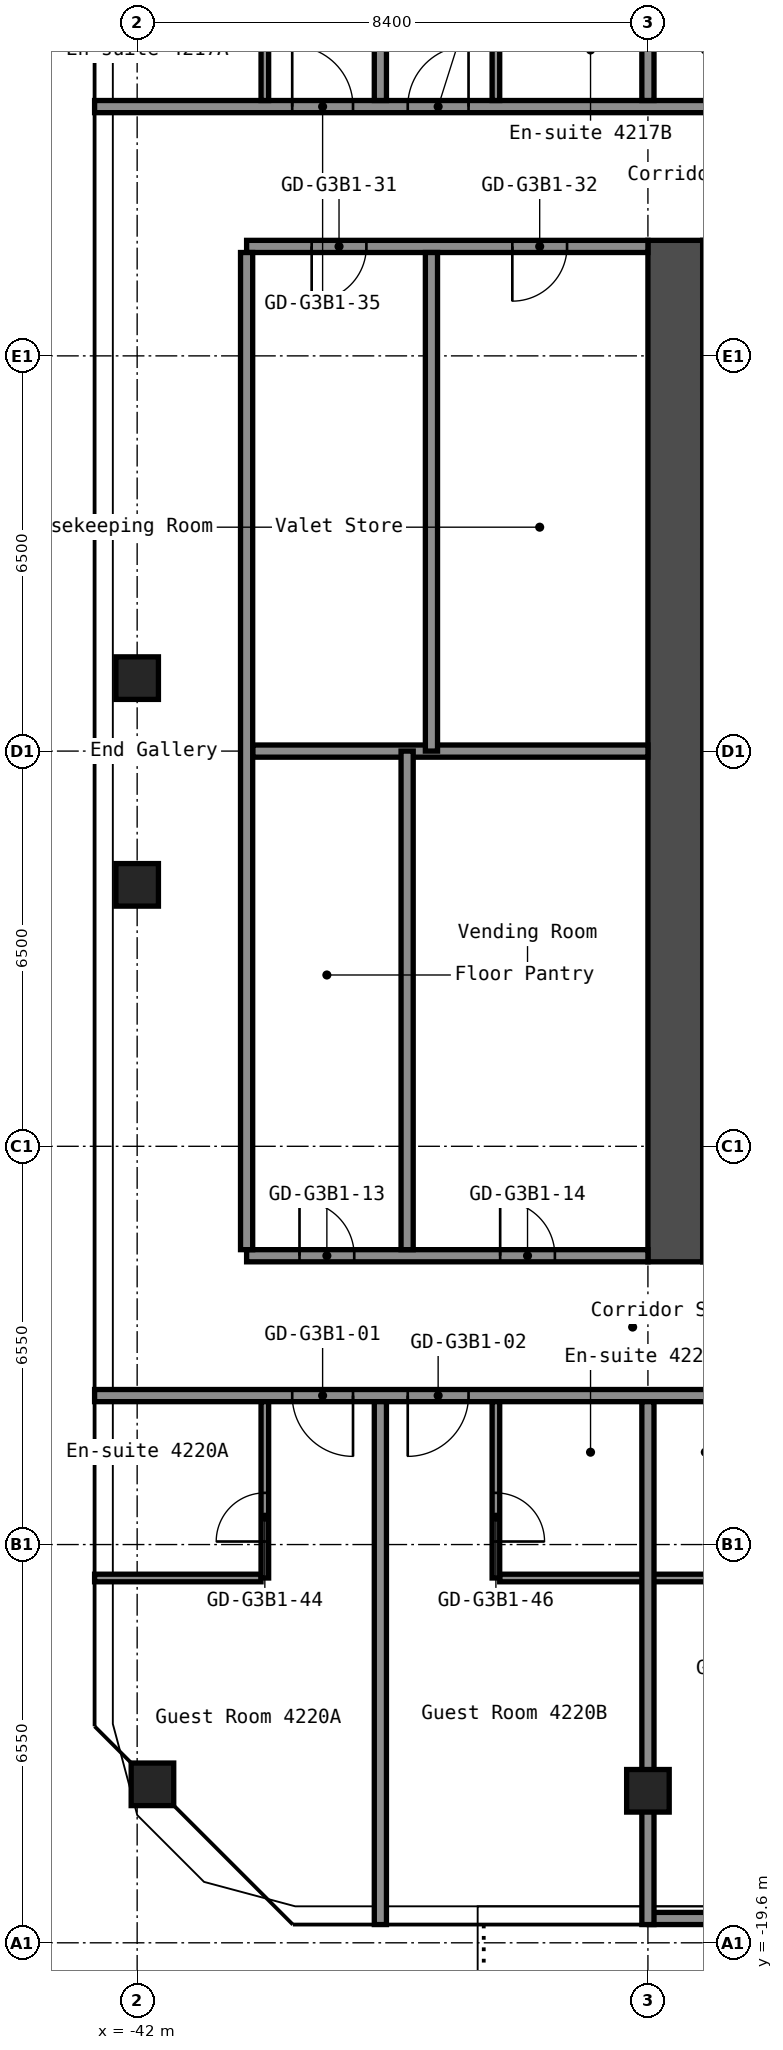
"""IFC4 building model, lengths in metres.
Left out: names, types, materials, properties, quantities, classifications, styles, units other than length and angle.
Written with IfcOpenShell. Run it as: python <this file> out.ifc"""

import sys

from ifc_helpers import new_model, si_unit, direction, frame, frame_2d, origin, origin_2d, place, context, subcontext, project, spatial, rectangle, hollow_rectangle, extrude, element, fill, save


model = new_model("IFC4")
c1 = context("Model", 3, precision=1e-05, world=origin(), true_north=direction((0.0, 1.0)))
c2 = subcontext(c1, "Body", "Model", "MODEL_VIEW")
j1 = project(units=[si_unit("LENGTHUNIT", "METRE"), si_unit("PLANEANGLEUNIT", "RADIAN")], contexts=[c1])
p1 = place(None, origin())
s1 = spatial("IfcSite", under=j1, at=p1, CompositionType="ELEMENT")
p2 = place(p1, origin())
s2 = spatial("IfcBuilding", under=s1, at=p2, CompositionType="ELEMENT")
p3 = place(p2, frame((0.0, 0.0, 150.2)))
s3 = spatial("IfcBuildingStorey", under=s2, at=p3, CompositionType="ELEMENT", Elevation=150.2)
for number, where, z_axis, x_axis in (
    (1, (-41.749, -16.994, 0.0), (0.0, 0.0, 1.0), (1.0, 0.0, 0.0)),
    (2, (-42.0, -2.2, 0.0), (0.0, 0.0, 1.0), (1.0, 0.0, 0.0)),
    (3, (-42.0, 1.2, 0.0), (0.0, 0.0, 1.0), (1.0, 0.0, 0.0)),
    (4, (-33.6, -17.1, 0.0), (0.0, 0.0, 1.0), (1.0, 0.0, 0.0)),
):
    element("IfcColumn", number, at=place(p3, frame(where, z_axis=z_axis, x_axis=x_axis)), inside=s3, PredefinedType="COLUMN", context=c2, shape_type="SweptSolid", body=[
        extrude(hollow_rectangle(XDim=0.7, YDim=0.7, WallThickness=0.028, at=origin_2d()), origin(), (0.0, 0.0, 1.0), 2.75),
    ])
p4 = place(p3, frame((-33.15, -8.4, 0.0), z_axis=(0.0, 0.0, 1.0), x_axis=(0.0, 1.0, 0.0)))
e5 = element("IfcWall", 5, at=p4, inside=s3, PredefinedType="SHEAR", context=c2, shape_type="SweptSolid", body=[
    extrude(rectangle(XDim=16.8, YDim=0.9, at=frame_2d((8.4, 0.0))), origin(), (0.0, 0.0, 1.0), 2.75),
])
p5 = place(p3, frame((-42.7, -13.6, 0.0), z_axis=(0.0, 0.0, 1.0), x_axis=(1.0, 0.0, 0.0)))
e6 = element("IfcWall", 6, at=p5, inside=s3, PredefinedType="PARTITIONING", context=c2, shape_type="SweptSolid", body=[
    extrude(rectangle(XDim=2.738, YDim=0.125, at=frame_2d((1.369, 0.0))), origin(), (0.0, 0.0, 1.0), 2.75),
])
p6 = place(p3, frame((-36.038, -13.6, 0.0), z_axis=(0.0, 0.0, 1.0), x_axis=(1.0, 0.0, 0.0)))
e7 = element("IfcWall", 7, at=p6, inside=s3, PredefinedType="PARTITIONING", context=c2, shape_type="SweptSolid", body=[
    extrude(rectangle(XDim=4.875, YDim=0.125, at=frame_2d((2.438, 0.0))), origin(), (0.0, 0.0, 1.0), 2.75),
])
p7 = place(p3, frame((-42.7, -10.6, 0.0), z_axis=(0.0, 0.0, 1.0), x_axis=(1.0, 0.0, 0.0)))
e8 = element("IfcWall", 8, at=p7, inside=s3, PredefinedType="PARTITIONING", context=c2, shape_type="SweptSolid", body=[
    extrude(rectangle(XDim=25.9, YDim=0.2, at=frame_2d((12.95, 0.0))), origin(), (0.0, 0.0, 1.0), 2.75),
])
p8 = place(p7, frame((3.25, 0.0, 0.0)))
e9 = element("IfcOpeningElement", 9, at=p8, cuts=e8, PredefinedType="OPENING", context=c2, shape_type="SweptSolid", body=[
    extrude(rectangle(XDim=1.0, YDim=2.1, at=frame_2d((0.5, 1.05))), frame((0.0, 0.11, 0.0), z_axis=(0.0, -1.0, 0.0), x_axis=(1.0, 0.0, 0.0)), (0.0, 0.0, 1.0), 0.22),
])
p9 = place(p7, frame((5.15, 0.0, 0.0)))
e10 = element("IfcOpeningElement", 10, at=p9, cuts=e8, PredefinedType="OPENING", context=c2, shape_type="SweptSolid", body=[
    extrude(rectangle(XDim=1.0, YDim=2.1, at=frame_2d((0.5, 1.05))), frame((0.0, 0.11, 0.0), z_axis=(0.0, -1.0, 0.0), x_axis=(1.0, 0.0, 0.0)), (0.0, 0.0, 1.0), 0.22),
])
p10 = place(p7, frame((11.95, 0.0, 0.0)))
e11 = element("IfcOpeningElement", 11, at=p10, cuts=e8, PredefinedType="OPENING", context=c2, shape_type="SweptSolid", body=[
    extrude(rectangle(XDim=1.0, YDim=2.1, at=frame_2d((0.5, 1.05))), frame((0.0, 0.11, 0.0), z_axis=(0.0, -1.0, 0.0), x_axis=(1.0, 0.0, 0.0)), (0.0, 0.0, 1.0), 0.22),
])
p11 = place(p7, frame((13.65, 0.0, 0.0)))
e12 = element("IfcOpeningElement", 12, at=p11, cuts=e8, PredefinedType="OPENING", context=c2, shape_type="SweptSolid", body=[
    extrude(rectangle(XDim=1.0, YDim=2.1, at=frame_2d((0.5, 1.05))), frame((0.0, 0.11, 0.0), z_axis=(0.0, -1.0, 0.0), x_axis=(1.0, 0.0, 0.0)), (0.0, 0.0, 1.0), 0.22),
])
p12 = place(p7, frame((20.35, 0.0, 0.0)))
e13 = element("IfcOpeningElement", 13, at=p12, cuts=e8, PredefinedType="OPENING", context=c2, shape_type="SweptSolid", body=[
    extrude(rectangle(XDim=1.0, YDim=2.1, at=frame_2d((0.5, 1.05))), frame((0.0, 0.11, 0.0), z_axis=(0.0, -1.0, 0.0), x_axis=(1.0, 0.0, 0.0)), (0.0, 0.0, 1.0), 0.22),
])
p13 = place(p7, frame((22.05, 0.0, 0.0)))
e14 = element("IfcOpeningElement", 14, at=p13, cuts=e8, PredefinedType="OPENING", context=c2, shape_type="SweptSolid", body=[
    extrude(rectangle(XDim=1.0, YDim=2.1, at=frame_2d((0.5, 1.05))), frame((0.0, 0.11, 0.0), z_axis=(0.0, -1.0, 0.0), x_axis=(1.0, 0.0, 0.0)), (0.0, 0.0, 1.0), 0.22),
])
p14 = place(p3, frame((-40.2, -8.3, 0.0), z_axis=(0.0, 0.0, 1.0), x_axis=(1.0, 0.0, 0.0)))
e15 = element("IfcWall", 15, at=p14, inside=s3, PredefinedType="PARTITIONING", context=c2, shape_type="SweptSolid", body=[
    extrude(rectangle(XDim=6.6, YDim=0.2, at=frame_2d((3.3, 0.0))), origin(), (0.0, 0.0, 1.0), 2.75),
])
p15 = place(p14, frame((0.87, 0.0, 0.0)))
e16 = element("IfcOpeningElement", 16, at=p15, cuts=e15, PredefinedType="OPENING", context=c2, shape_type="SweptSolid", body=[
    extrude(rectangle(XDim=0.9, YDim=2.1, at=frame_2d((0.45, 1.05))), frame((0.0, 0.11, 0.0), z_axis=(0.0, -1.0, 0.0), x_axis=(1.0, 0.0, 0.0)), (0.0, 0.0, 1.0), 0.22),
])
p16 = place(p14, frame((4.17, 0.0, 0.0)))
e17 = element("IfcOpeningElement", 17, at=p16, cuts=e15, PredefinedType="OPENING", context=c2, shape_type="SweptSolid", body=[
    extrude(rectangle(XDim=0.9, YDim=2.1, at=frame_2d((0.45, 1.05))), frame((0.0, 0.11, 0.0), z_axis=(0.0, -1.0, 0.0), x_axis=(1.0, 0.0, 0.0)), (0.0, 0.0, 1.0), 0.22),
])
p17 = place(p3, frame((-40.1, 0.0, 0.0), z_axis=(0.0, 0.0, 1.0), x_axis=(1.0, 0.0, 0.0)))
e18 = element("IfcWall", 18, at=p17, inside=s3, PredefinedType="PARTITIONING", context=c2, shape_type="SweptSolid", body=[
    extrude(rectangle(XDim=6.5, YDim=0.2, at=frame_2d((3.25, 0.0))), origin(), (0.0, 0.0, 1.0), 2.75),
])
p18 = place(p3, frame((-40.2, 8.3, 0.0), z_axis=(0.0, 0.0, 1.0), x_axis=(1.0, 0.0, 0.0)))
e19 = element("IfcWall", 19, at=p18, inside=s3, PredefinedType="PARTITIONING", context=c2, shape_type="SweptSolid", body=[
    extrude(rectangle(XDim=6.6, YDim=0.2, at=frame_2d((3.3, 0.0))), origin(), (0.0, 0.0, 1.0), 2.75),
])
p19 = place(p18, frame((1.07, 0.0, 0.0)))
e20 = element("IfcOpeningElement", 20, at=p19, cuts=e19, PredefinedType="OPENING", context=c2, shape_type="SweptSolid", body=[
    extrude(rectangle(XDim=0.9, YDim=2.1, at=frame_2d((0.45, 1.05))), frame((0.0, 0.11, 0.0), z_axis=(0.0, -1.0, 0.0), x_axis=(1.0, 0.0, 0.0)), (0.0, 0.0, 1.0), 0.22),
])
p20 = place(p18, frame((4.37, 0.0, 0.0)))
e21 = element("IfcOpeningElement", 21, at=p20, cuts=e19, PredefinedType="OPENING", context=c2, shape_type="SweptSolid", body=[
    extrude(rectangle(XDim=0.9, YDim=2.1, at=frame_2d((0.45, 1.05))), frame((0.0, 0.11, 0.0), z_axis=(0.0, -1.0, 0.0), x_axis=(1.0, 0.0, 0.0)), (0.0, 0.0, 1.0), 0.22),
])
p21 = place(p3, frame((-42.7, 10.6, 0.0), z_axis=(0.0, 0.0, 1.0), x_axis=(1.0, 0.0, 0.0)))
e22 = element("IfcWall", 22, at=p21, inside=s3, PredefinedType="PARTITIONING", context=c2, shape_type="SweptSolid", body=[
    extrude(rectangle(XDim=25.9, YDim=0.2, at=frame_2d((12.95, 0.0))), origin(), (0.0, 0.0, 1.0), 2.75),
])
p22 = place(p21, frame((3.25, 0.0, 0.0)))
e23 = element("IfcOpeningElement", 23, at=p22, cuts=e22, PredefinedType="OPENING", context=c2, shape_type="SweptSolid", body=[
    extrude(rectangle(XDim=1.0, YDim=2.1, at=frame_2d((0.5, 1.05))), frame((0.0, 0.11, 0.0), z_axis=(0.0, -1.0, 0.0), x_axis=(1.0, 0.0, 0.0)), (0.0, 0.0, 1.0), 0.22),
])
p23 = place(p21, frame((5.15, 0.0, 0.0)))
e24 = element("IfcOpeningElement", 24, at=p23, cuts=e22, PredefinedType="OPENING", context=c2, shape_type="SweptSolid", body=[
    extrude(rectangle(XDim=1.0, YDim=2.1, at=frame_2d((0.5, 1.05))), frame((0.0, 0.11, 0.0), z_axis=(0.0, -1.0, 0.0), x_axis=(1.0, 0.0, 0.0)), (0.0, 0.0, 1.0), 0.22),
])
p24 = place(p21, frame((11.95, 0.0, 0.0)))
e25 = element("IfcOpeningElement", 25, at=p24, cuts=e22, PredefinedType="OPENING", context=c2, shape_type="SweptSolid", body=[
    extrude(rectangle(XDim=1.0, YDim=2.1, at=frame_2d((0.5, 1.05))), frame((0.0, 0.11, 0.0), z_axis=(0.0, -1.0, 0.0), x_axis=(1.0, 0.0, 0.0)), (0.0, 0.0, 1.0), 0.22),
])
p25 = place(p21, frame((13.65, 0.0, 0.0)))
e26 = element("IfcOpeningElement", 26, at=p25, cuts=e22, PredefinedType="OPENING", context=c2, shape_type="SweptSolid", body=[
    extrude(rectangle(XDim=1.0, YDim=2.1, at=frame_2d((0.5, 1.05))), frame((0.0, 0.11, 0.0), z_axis=(0.0, -1.0, 0.0), x_axis=(1.0, 0.0, 0.0)), (0.0, 0.0, 1.0), 0.22),
])
p26 = place(p21, frame((20.35, 0.0, 0.0)))
e27 = element("IfcOpeningElement", 27, at=p26, cuts=e22, PredefinedType="OPENING", context=c2, shape_type="SweptSolid", body=[
    extrude(rectangle(XDim=1.0, YDim=2.1, at=frame_2d((0.5, 1.05))), frame((0.0, 0.11, 0.0), z_axis=(0.0, -1.0, 0.0), x_axis=(1.0, 0.0, 0.0)), (0.0, 0.0, 1.0), 0.22),
])
p27 = place(p21, frame((22.05, 0.0, 0.0)))
e28 = element("IfcOpeningElement", 28, at=p27, cuts=e22, PredefinedType="OPENING", context=c2, shape_type="SweptSolid", body=[
    extrude(rectangle(XDim=1.0, YDim=2.1, at=frame_2d((0.5, 1.05))), frame((0.0, 0.11, 0.0), z_axis=(0.0, -1.0, 0.0), x_axis=(1.0, 0.0, 0.0)), (0.0, 0.0, 1.0), 0.22),
])
p28 = place(p3, frame((-40.2, -8.2, 0.0), z_axis=(0.0, 0.0, 1.0), x_axis=(0.0, 1.0, 0.0)))
e29 = element("IfcWall", 29, at=p28, inside=s3, PredefinedType="PARTITIONING", context=c2, shape_type="SweptSolid", body=[
    extrude(rectangle(XDim=16.4, YDim=0.2, at=frame_2d((8.2, 0.0))), origin(), (0.0, 0.0, 1.0), 2.75),
])
p29 = place(p3, frame((-39.9, -13.6, 0.0), z_axis=(0.0, 0.0, 1.0), x_axis=(0.0, 1.0, 0.0)))
e30 = element("IfcWall", 30, at=p29, inside=s3, PredefinedType="PARTITIONING", context=c2, shape_type="SweptSolid", body=[
    extrude(rectangle(XDim=2.9, YDim=0.125, at=frame_2d((1.45, 0.0))), origin(), (0.0, 0.0, 1.0), 2.75),
])
p30 = place(p29, frame((0.6, 0.0, 0.0)))
e31 = element("IfcOpeningElement", 31, at=p30, cuts=e30, PredefinedType="OPENING", context=c2, shape_type="SweptSolid", body=[
    extrude(rectangle(XDim=0.8, YDim=2.1, at=frame_2d((0.4, 1.05))), frame((0.0, 0.073, 0.0), z_axis=(0.0, -1.0, 0.0), x_axis=(1.0, 0.0, 0.0)), (0.0, 0.0, 1.0), 0.145),
])
p31 = place(p3, frame((-39.9, 10.7, 0.0), z_axis=(0.0, 0.0, 1.0), x_axis=(0.0, 1.0, 0.0)))
e32 = element("IfcWall", 32, at=p31, inside=s3, PredefinedType="PARTITIONING", context=c2, shape_type="SweptSolid", body=[
    extrude(rectangle(XDim=2.9, YDim=0.125, at=frame_2d((1.45, 0.0))), origin(), (0.0, 0.0, 1.0), 2.75),
])
p32 = place(p31, frame((1.5, 0.0, 0.0)))
e33 = element("IfcOpeningElement", 33, at=p32, cuts=e32, PredefinedType="OPENING", context=c2, shape_type="SweptSolid", body=[
    extrude(rectangle(XDim=0.8, YDim=2.1, at=frame_2d((0.4, 1.05))), frame((0.0, 0.073, 0.0), z_axis=(0.0, -1.0, 0.0), x_axis=(1.0, 0.0, 0.0)), (0.0, 0.0, 1.0), 0.145),
])
p33 = place(p3, frame((-38.0, -19.3, 0.0), z_axis=(0.0, 0.0, 1.0), x_axis=(0.0, 1.0, 0.0)))
e34 = element("IfcWall", 34, at=p33, inside=s3, PredefinedType="PARTITIONING", context=c2, shape_type="SweptSolid", body=[
    extrude(rectangle(XDim=8.6, YDim=0.2, at=frame_2d((4.3, 0.0))), origin(), (0.0, 0.0, 1.0), 2.75),
])
p34 = place(p3, frame((-38.0, 10.7, 0.0), z_axis=(0.0, 0.0, 1.0), x_axis=(0.0, 1.0, 0.0)))
e35 = element("IfcWall", 35, at=p34, inside=s3, PredefinedType="PARTITIONING", context=c2, shape_type="SweptSolid", body=[
    extrude(rectangle(XDim=7.6, YDim=0.2, at=frame_2d((3.8, 0.0))), origin(), (0.0, 0.0, 1.0), 2.75),
])
for number, where, z_axis, x_axis in (
    (36, (-37.56, -8.2, 0.0), (0.0, 0.0, 1.0), (0.0, 1.0, 0.0)),
    (37, (-37.16, 0.0, 0.0), (0.0, 0.0, 1.0), (0.0, 1.0, 0.0)),
):
    element("IfcWall", number, at=place(p3, frame(where, z_axis=z_axis, x_axis=x_axis)), inside=s3, PredefinedType="PARTITIONING", context=c2, shape_type="SweptSolid", body=[
        extrude(rectangle(XDim=8.2, YDim=0.2, at=frame_2d((4.1, 0.0))), origin(), (0.0, 0.0, 1.0), 2.75),
    ])
p35 = place(p3, frame((-36.1, -13.6, 0.0), z_axis=(0.0, 0.0, 1.0), x_axis=(0.0, 1.0, 0.0)))
e38 = element("IfcWall", 38, at=p35, inside=s3, PredefinedType="PARTITIONING", context=c2, shape_type="SweptSolid", body=[
    extrude(rectangle(XDim=2.9, YDim=0.125, at=frame_2d((1.45, 0.0))), origin(), (0.0, 0.0, 1.0), 2.75),
])
p36 = place(p35, frame((0.6, 0.0, 0.0)))
e39 = element("IfcOpeningElement", 39, at=p36, cuts=e38, PredefinedType="OPENING", context=c2, shape_type="SweptSolid", body=[
    extrude(rectangle(XDim=0.8, YDim=2.1, at=frame_2d((0.4, 1.05))), frame((0.0, 0.073, 0.0), z_axis=(0.0, -1.0, 0.0), x_axis=(1.0, 0.0, 0.0)), (0.0, 0.0, 1.0), 0.145),
])
p37 = place(p3, frame((-36.1, 10.7, 0.0), z_axis=(0.0, 0.0, 1.0), x_axis=(0.0, 1.0, 0.0)))
e40 = element("IfcWall", 40, at=p37, inside=s3, PredefinedType="PARTITIONING", context=c2, shape_type="SweptSolid", body=[
    extrude(rectangle(XDim=2.9, YDim=0.125, at=frame_2d((1.45, 0.0))), origin(), (0.0, 0.0, 1.0), 2.75),
])
p38 = place(p37, frame((1.5, 0.0, 0.0)))
e41 = element("IfcOpeningElement", 41, at=p38, cuts=e40, PredefinedType="OPENING", context=c2, shape_type="SweptSolid", body=[
    extrude(rectangle(XDim=0.8, YDim=2.1, at=frame_2d((0.4, 1.05))), frame((0.0, 0.073, 0.0), z_axis=(0.0, -1.0, 0.0), x_axis=(1.0, 0.0, 0.0)), (0.0, 0.0, 1.0), 0.145),
])
p39 = place(p3, frame((-33.6, -19.3, 0.0), z_axis=(0.0, 0.0, 1.0), x_axis=(0.0, 1.0, 0.0)))
e42 = element("IfcWall", 42, at=p39, inside=s3, PredefinedType="PARTITIONING", context=c2, shape_type="SweptSolid", body=[
    extrude(rectangle(XDim=8.6, YDim=0.2, at=frame_2d((4.3, 0.0))), origin(), (0.0, 0.0, 1.0), 2.75),
])
p40 = place(p3, frame((-33.6, 10.7, 0.0), z_axis=(0.0, 0.0, 1.0), x_axis=(0.0, 1.0, 0.0)))
e43 = element("IfcWall", 43, at=p40, inside=s3, PredefinedType="PARTITIONING", context=c2, shape_type="SweptSolid", body=[
    extrude(rectangle(XDim=7.6, YDim=0.2, at=frame_2d((3.8, 0.0))), origin(), (0.0, 0.0, 1.0), 2.75),
])
p41 = place(p8, origin())
e44 = element("IfcDoor", 44, at=p41, inside=s3, OperationType="SINGLE_SWING_RIGHT", PredefinedType="DOOR", context=c2, shape_type="SweptSolid", body=[
    extrude(rectangle(XDim=1.0, YDim=2.1, at=frame_2d((0.5, 1.05))), frame((0.0, 0.025, 0.0), z_axis=(0.0, -1.0, 0.0), x_axis=(1.0, 0.0, 0.0)), (0.0, 0.0, 1.0), 0.05),
])
fill(e9, e44)
p42 = place(p9, origin())
e45 = element("IfcDoor", 45, at=p42, inside=s3, OperationType="SINGLE_SWING_LEFT", PredefinedType="DOOR", context=c2, shape_type="SweptSolid", body=[
    extrude(rectangle(XDim=1.0, YDim=2.1, at=frame_2d((0.5, 1.05))), frame((0.0, 0.025, 0.0), z_axis=(0.0, -1.0, 0.0), x_axis=(1.0, 0.0, 0.0)), (0.0, 0.0, 1.0), 0.05),
])
fill(e10, e45)
p43 = place(p15, origin())
e46 = element("IfcDoor", 46, at=p43, inside=s3, OperationType="SINGLE_SWING_RIGHT", PredefinedType="DOOR", context=c2, shape_type="SweptSolid", body=[
    extrude(rectangle(XDim=0.9, YDim=2.1, at=frame_2d((0.45, 1.05))), frame((0.0, 0.025, 0.0), z_axis=(0.0, -1.0, 0.0), x_axis=(1.0, 0.0, 0.0)), (0.0, 0.0, 1.0), 0.05),
])
fill(e16, e46)
p44 = place(p16, origin())
e47 = element("IfcDoor", 47, at=p44, inside=s3, OperationType="SINGLE_SWING_RIGHT", PredefinedType="DOOR", context=c2, shape_type="SweptSolid", body=[
    extrude(rectangle(XDim=0.9, YDim=2.1, at=frame_2d((0.45, 1.05))), frame((0.0, 0.025, 0.0), z_axis=(0.0, -1.0, 0.0), x_axis=(1.0, 0.0, 0.0)), (0.0, 0.0, 1.0), 0.05),
])
fill(e17, e47)
p45 = place(p19, origin())
e48 = element("IfcDoor", 48, at=p45, inside=s3, OperationType="SINGLE_SWING_LEFT", PredefinedType="DOOR", context=c2, shape_type="SweptSolid", body=[
    extrude(rectangle(XDim=0.9, YDim=2.1, at=frame_2d((0.45, 1.05))), frame((0.0, 0.025, 0.0), z_axis=(0.0, -1.0, 0.0), x_axis=(1.0, 0.0, 0.0)), (0.0, 0.0, 1.0), 0.05),
])
fill(e20, e48)
p46 = place(p20, origin())
e49 = element("IfcDoor", 49, at=p46, inside=s3, OperationType="SINGLE_SWING_LEFT", PredefinedType="DOOR", context=c2, shape_type="SweptSolid", body=[
    extrude(rectangle(XDim=0.9, YDim=2.1, at=frame_2d((0.45, 1.05))), frame((0.0, 0.025, 0.0), z_axis=(0.0, -1.0, 0.0), x_axis=(1.0, 0.0, 0.0)), (0.0, 0.0, 1.0), 0.05),
])
fill(e21, e49)
p47 = place(p22, origin())
e50 = element("IfcDoor", 50, at=p47, inside=s3, OperationType="SINGLE_SWING_RIGHT", PredefinedType="DOOR", context=c2, shape_type="SweptSolid", body=[
    extrude(rectangle(XDim=1.0, YDim=2.1, at=frame_2d((0.5, 1.05))), frame((0.0, 0.025, 0.0), z_axis=(0.0, -1.0, 0.0), x_axis=(1.0, 0.0, 0.0)), (0.0, 0.0, 1.0), 0.05),
])
fill(e23, e50)
p48 = place(p23, origin())
e51 = element("IfcDoor", 51, at=p48, inside=s3, OperationType="SINGLE_SWING_LEFT", PredefinedType="DOOR", context=c2, shape_type="SweptSolid", body=[
    extrude(rectangle(XDim=1.0, YDim=2.1, at=frame_2d((0.5, 1.05))), frame((0.0, 0.025, 0.0), z_axis=(0.0, -1.0, 0.0), x_axis=(1.0, 0.0, 0.0)), (0.0, 0.0, 1.0), 0.05),
])
fill(e24, e51)
p49 = place(p30, origin())
e52 = element("IfcDoor", 52, at=p49, inside=s3, OperationType="SINGLE_SWING_RIGHT", PredefinedType="DOOR", context=c2, shape_type="SweptSolid", body=[
    extrude(rectangle(XDim=0.8, YDim=2.1, at=frame_2d((0.4, 1.05))), frame((0.0, 0.025, 0.0), z_axis=(0.0, -1.0, 0.0), x_axis=(1.0, 0.0, 0.0)), (0.0, 0.0, 1.0), 0.05),
])
fill(e31, e52)
p50 = place(p36, origin())
e53 = element("IfcDoor", 53, at=p50, inside=s3, OperationType="SINGLE_SWING_LEFT", PredefinedType="DOOR", context=c2, shape_type="SweptSolid", body=[
    extrude(rectangle(XDim=0.8, YDim=2.1, at=frame_2d((0.4, 1.05))), frame((0.0, 0.025, 0.0), z_axis=(0.0, -1.0, 0.0), x_axis=(1.0, 0.0, 0.0)), (0.0, 0.0, 1.0), 0.05),
])
fill(e39, e53)
save(model, sys.argv[1])
